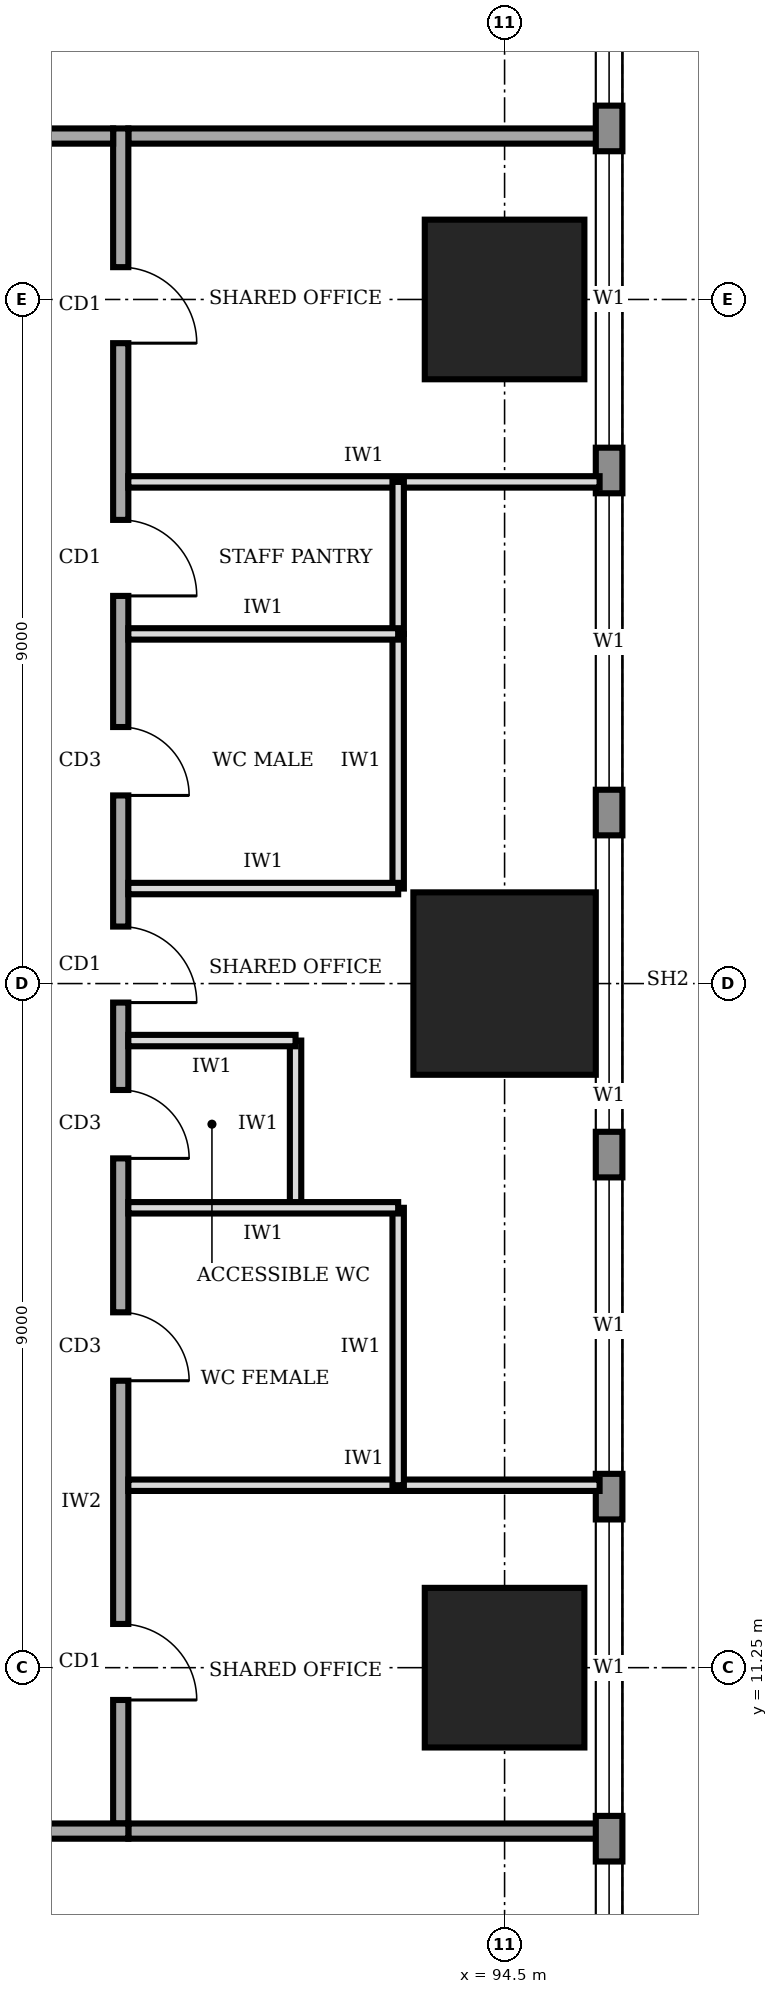
"""IFC4 building model, lengths in metres.
Left out: names, types, materials, properties, quantities, classifications, styles, units other than length and angle.
Written with IfcOpenShell. Run it as: python <this file> out.ifc"""

import sys

from ifc_helpers import new_model, si_unit, direction, frame, frame_2d, origin, origin_2d, place, context, subcontext, project, spatial, rectangle, extrude, element, fill, save


model = new_model("IFC4")
c1 = context("Model", 3, precision=1e-05, world=origin(), true_north=direction((0.0, 1.0)))
c2 = subcontext(c1, "Body", "Model", "MODEL_VIEW")
j1 = project(units=[si_unit("LENGTHUNIT", "METRE"), si_unit("PLANEANGLEUNIT", "RADIAN")], contexts=[c1])
p1 = place(None, origin())
s1 = spatial("IfcSite", under=j1, at=p1, CompositionType="ELEMENT")
p2 = place(p1, origin())
s2 = spatial("IfcBuilding", under=s1, at=p2, CompositionType="ELEMENT")
p3 = place(p2, frame((0.0, 0.0, 129.0)))
s3 = spatial("IfcBuildingStorey", under=s2, at=p3, CompositionType="ELEMENT", Elevation=129.0)
p4 = place(p3, frame((94.5, 11.25, 0.0), z_axis=(0.0, 0.0, 1.0), x_axis=(1.0, 0.0, 0.0)))
e1 = element("IfcColumn", 1, at=p4, inside=s3, PredefinedType="COLUMN", context=c2, shape_type="SweptSolid", body=[
    extrude(rectangle(XDim=2.1, YDim=2.1, at=origin_2d()), origin(), (0.0, 0.0, 1.0), 4.0),
])
p5 = place(p3, frame((94.5, 20.25, 0.0), z_axis=(0.0, 0.0, 1.0), x_axis=(1.0, 0.0, 0.0)))
e2 = element("IfcColumn", 2, at=p5, inside=s3, PredefinedType="COLUMN", context=c2, shape_type="SweptSolid", body=[
    extrude(rectangle(XDim=2.4, YDim=2.4, at=origin_2d()), origin(), (0.0, 0.0, 1.0), 4.0),
])
p6 = place(p3, frame((94.5, 29.25, 0.0), z_axis=(0.0, 0.0, 1.0), x_axis=(1.0, 0.0, 0.0)))
e3 = element("IfcColumn", 3, at=p6, inside=s3, PredefinedType="COLUMN", context=c2, shape_type="SweptSolid", body=[
    extrude(rectangle(XDim=2.1, YDim=2.1, at=origin_2d()), origin(), (0.0, 0.0, 1.0), 4.0),
])
p7 = place(p3, frame((95.875, 3.32, 0.0), z_axis=(0.0, 0.0, 1.0), x_axis=(0.0, 1.0, 0.0)))
e4 = element("IfcWall", 4, at=p7, inside=s3, PredefinedType="STANDARD", context=c2, shape_type="SweptSolid", body=[
    extrude(rectangle(XDim=33.96, YDim=0.35, at=frame_2d((16.98, 0.0))), origin(), (0.0, 0.0, 1.0), 3.75),
])
p8 = place(p7, frame((1.48, 0.0, 0.9)))
e5 = element("IfcOpeningElement", 5, at=p8, cuts=e4, PredefinedType="OPENING", context=c2, shape_type="SweptSolid", body=[
    extrude(rectangle(XDim=3.9, YDim=2.2, at=frame_2d((1.95, 1.1))), frame((0.0, 0.185, 0.0), z_axis=(0.0, -1.0, 0.0), x_axis=(1.0, 0.0, 0.0)), (0.0, 0.0, 1.0), 0.37),
])
p9 = place(p7, frame((5.98, 0.0, 0.9)))
e6 = element("IfcOpeningElement", 6, at=p9, cuts=e4, PredefinedType="OPENING", context=c2, shape_type="SweptSolid", body=[
    extrude(rectangle(XDim=3.9, YDim=2.2, at=frame_2d((1.95, 1.1))), frame((0.0, 0.185, 0.0), z_axis=(0.0, -1.0, 0.0), x_axis=(1.0, 0.0, 0.0)), (0.0, 0.0, 1.0), 0.37),
])
p10 = place(p7, frame((10.48, 0.0, 0.9)))
e7 = element("IfcOpeningElement", 7, at=p10, cuts=e4, PredefinedType="OPENING", context=c2, shape_type="SweptSolid", body=[
    extrude(rectangle(XDim=3.9, YDim=2.2, at=frame_2d((1.95, 1.1))), frame((0.0, 0.185, 0.0), z_axis=(0.0, -1.0, 0.0), x_axis=(1.0, 0.0, 0.0)), (0.0, 0.0, 1.0), 0.37),
])
p11 = place(p7, frame((14.98, 0.0, 0.9)))
e8 = element("IfcOpeningElement", 8, at=p11, cuts=e4, PredefinedType="OPENING", context=c2, shape_type="SweptSolid", body=[
    extrude(rectangle(XDim=3.9, YDim=2.2, at=frame_2d((1.95, 1.1))), frame((0.0, 0.185, 0.0), z_axis=(0.0, -1.0, 0.0), x_axis=(1.0, 0.0, 0.0)), (0.0, 0.0, 1.0), 0.37),
])
p12 = place(p7, frame((19.48, 0.0, 0.9)))
e9 = element("IfcOpeningElement", 9, at=p12, cuts=e4, PredefinedType="OPENING", context=c2, shape_type="SweptSolid", body=[
    extrude(rectangle(XDim=3.9, YDim=2.2, at=frame_2d((1.95, 1.1))), frame((0.0, 0.185, 0.0), z_axis=(0.0, -1.0, 0.0), x_axis=(1.0, 0.0, 0.0)), (0.0, 0.0, 1.0), 0.37),
])
p13 = place(p7, frame((23.98, 0.0, 0.9)))
e10 = element("IfcOpeningElement", 10, at=p13, cuts=e4, PredefinedType="OPENING", context=c2, shape_type="SweptSolid", body=[
    extrude(rectangle(XDim=3.9, YDim=2.2, at=frame_2d((1.95, 1.1))), frame((0.0, 0.185, 0.0), z_axis=(0.0, -1.0, 0.0), x_axis=(1.0, 0.0, 0.0)), (0.0, 0.0, 1.0), 0.37),
])
p14 = place(p7, frame((28.48, 0.0, 0.9)))
e11 = element("IfcOpeningElement", 11, at=p14, cuts=e4, PredefinedType="OPENING", context=c2, shape_type="SweptSolid", body=[
    extrude(rectangle(XDim=3.9, YDim=2.2, at=frame_2d((1.95, 1.1))), frame((0.0, 0.185, 0.0), z_axis=(0.0, -1.0, 0.0), x_axis=(1.0, 0.0, 0.0)), (0.0, 0.0, 1.0), 0.37),
])
p15 = place(p3, frame((72.65, 9.1, 0.0), z_axis=(0.0, 0.0, 1.0), x_axis=(1.0, 0.0, 0.0)))
e12 = element("IfcWall", 12, at=p15, inside=s3, PredefinedType="SOLIDWALL", context=c2, shape_type="SweptSolid", body=[
    extrude(rectangle(XDim=16.9, YDim=0.2, at=frame_2d((8.45, 0.0))), origin(), (0.0, 0.0, 1.0), 3.75),
])
p16 = place(p15, frame((1.325, 0.0, 0.0)))
e13 = element("IfcOpeningElement", 13, at=p16, cuts=e12, PredefinedType="OPENING", context=c2, shape_type="SweptSolid", body=[
    extrude(rectangle(XDim=1.0, YDim=2.1, at=frame_2d((0.5, 1.05))), frame((0.0, 0.11, 0.0), z_axis=(0.0, -1.0, 0.0), x_axis=(1.0, 0.0, 0.0)), (0.0, 0.0, 1.0), 0.22),
])
p17 = place(p15, frame((5.6, 0.0, 0.0)))
e14 = element("IfcOpeningElement", 14, at=p17, cuts=e12, PredefinedType="OPENING", context=c2, shape_type="SweptSolid", body=[
    extrude(rectangle(XDim=1.0, YDim=2.1, at=frame_2d((0.5, 1.05))), frame((0.0, 0.11, 0.0), z_axis=(0.0, -1.0, 0.0), x_axis=(1.0, 0.0, 0.0)), (0.0, 0.0, 1.0), 0.22),
])
p18 = place(p15, frame((12.125, 0.0, 0.0)))
e15 = element("IfcOpeningElement", 15, at=p18, cuts=e12, PredefinedType="OPENING", context=c2, shape_type="SweptSolid", body=[
    extrude(rectangle(XDim=1.0, YDim=2.1, at=frame_2d((0.5, 1.05))), frame((0.0, 0.11, 0.0), z_axis=(0.0, -1.0, 0.0), x_axis=(1.0, 0.0, 0.0)), (0.0, 0.0, 1.0), 0.22),
])
p19 = place(p3, frame((89.45, 9.2, 0.0), z_axis=(0.0, 0.0, 1.0), x_axis=(0.0, 1.0, 0.0)))
e16 = element("IfcWall", 16, at=p19, inside=s3, PredefinedType="SOLIDWALL", context=c2, shape_type="SweptSolid", body=[
    extrude(rectangle(XDim=22.3, YDim=0.2, at=frame_2d((11.15, 0.0))), origin(), (0.0, 0.0, 1.0), 3.75),
])
p20 = place(p19, frame((1.625, 0.0, 0.0)))
e17 = element("IfcOpeningElement", 17, at=p20, cuts=e16, PredefinedType="OPENING", context=c2, shape_type="SweptSolid", body=[
    extrude(rectangle(XDim=1.0, YDim=2.1, at=frame_2d((0.5, 1.05))), frame((0.0, 0.11, 0.0), z_axis=(0.0, -1.0, 0.0), x_axis=(1.0, 0.0, 0.0)), (0.0, 0.0, 1.0), 0.22),
])
p21 = place(p19, frame((5.825, 0.0, 0.0)))
e18 = element("IfcOpeningElement", 18, at=p21, cuts=e16, PredefinedType="OPENING", context=c2, shape_type="SweptSolid", body=[
    extrude(rectangle(XDim=0.9, YDim=2.1, at=frame_2d((0.45, 1.05))), frame((0.0, 0.11, 0.0), z_axis=(0.0, -1.0, 0.0), x_axis=(1.0, 0.0, 0.0)), (0.0, 0.0, 1.0), 0.22),
])
p22 = place(p19, frame((8.75, 0.0, 0.0)))
e19 = element("IfcOpeningElement", 19, at=p22, cuts=e16, PredefinedType="OPENING", context=c2, shape_type="SweptSolid", body=[
    extrude(rectangle(XDim=0.9, YDim=2.1, at=frame_2d((0.45, 1.05))), frame((0.0, 0.11, 0.0), z_axis=(0.0, -1.0, 0.0), x_axis=(1.0, 0.0, 0.0)), (0.0, 0.0, 1.0), 0.22),
])
p23 = place(p19, frame((13.525, 0.0, 0.0)))
e20 = element("IfcOpeningElement", 20, at=p23, cuts=e16, PredefinedType="OPENING", context=c2, shape_type="SweptSolid", body=[
    extrude(rectangle(XDim=0.9, YDim=2.1, at=frame_2d((0.45, 1.05))), frame((0.0, 0.11, 0.0), z_axis=(0.0, -1.0, 0.0), x_axis=(1.0, 0.0, 0.0)), (0.0, 0.0, 1.0), 0.22),
])
p24 = place(p19, frame((16.15, 0.0, 0.0)))
e21 = element("IfcOpeningElement", 21, at=p24, cuts=e16, PredefinedType="OPENING", context=c2, shape_type="SweptSolid", body=[
    extrude(rectangle(XDim=1.0, YDim=2.1, at=frame_2d((0.5, 1.05))), frame((0.0, 0.11, 0.0), z_axis=(0.0, -1.0, 0.0), x_axis=(1.0, 0.0, 0.0)), (0.0, 0.0, 1.0), 0.22),
])
p25 = place(p19, frame((10.8, 0.0, 0.0)))
e22 = element("IfcOpeningElement", 22, at=p25, cuts=e16, PredefinedType="OPENING", context=c2, shape_type="SweptSolid", body=[
    extrude(rectangle(XDim=1.0, YDim=2.1, at=frame_2d((0.5, 1.05))), frame((0.0, 0.11, 0.0), z_axis=(0.0, -1.0, 0.0), x_axis=(1.0, 0.0, 0.0)), (0.0, 0.0, 1.0), 0.22),
])
p26 = place(p19, frame((19.475, 0.0, 0.0)))
e23 = element("IfcOpeningElement", 23, at=p26, cuts=e16, PredefinedType="OPENING", context=c2, shape_type="SweptSolid", body=[
    extrude(rectangle(XDim=1.0, YDim=2.1, at=frame_2d((0.5, 1.05))), frame((0.0, 0.11, 0.0), z_axis=(0.0, -1.0, 0.0), x_axis=(1.0, 0.0, 0.0)), (0.0, 0.0, 1.0), 0.22),
])
p27 = place(p3, frame((89.35, 31.4, 0.0), z_axis=(0.0, 0.0, 1.0), x_axis=(-1.0, 0.0, 0.0)))
e24 = element("IfcWall", 24, at=p27, inside=s3, PredefinedType="SOLIDWALL", context=c2, shape_type="SweptSolid", body=[
    extrude(rectangle(XDim=16.9, YDim=0.2, at=frame_2d((8.45, 0.0))), origin(), (0.0, 0.0, 1.0), 3.75),
])
p28 = place(p27, frame((13.975, 0.0, 0.0)))
e25 = element("IfcOpeningElement", 25, at=p28, cuts=e24, PredefinedType="OPENING", context=c2, shape_type="SweptSolid", body=[
    extrude(rectangle(XDim=1.8, YDim=2.1, at=frame_2d((0.9, 1.05))), frame((0.0, 0.11, 0.0), z_axis=(0.0, -1.0, 0.0), x_axis=(1.0, 0.0, 0.0)), (0.0, 0.0, 1.0), 0.22),
])
p29 = place(p27, frame((7.85, 0.0, 0.0)))
e26 = element("IfcOpeningElement", 26, at=p29, cuts=e24, PredefinedType="OPENING", context=c2, shape_type="SweptSolid", body=[
    extrude(rectangle(XDim=1.0, YDim=2.1, at=frame_2d((0.5, 1.05))), frame((0.0, 0.11, 0.0), z_axis=(0.0, -1.0, 0.0), x_axis=(1.0, 0.0, 0.0)), (0.0, 0.0, 1.0), 0.22),
])
p30 = place(p27, frame((1.325, 0.0, 0.0)))
e27 = element("IfcOpeningElement", 27, at=p30, cuts=e24, PredefinedType="OPENING", context=c2, shape_type="SweptSolid", body=[
    extrude(rectangle(XDim=1.0, YDim=2.1, at=frame_2d((0.5, 1.05))), frame((0.0, 0.11, 0.0), z_axis=(0.0, -1.0, 0.0), x_axis=(1.0, 0.0, 0.0)), (0.0, 0.0, 1.0), 0.22),
])
for number, where, z_axis, x_axis in (
    (28, (89.55, 9.1, 0.0), (0.0, 0.0, 1.0), (1.0, 0.0, 0.0)),
    (29, (89.55, 31.4, 0.0), (0.0, 0.0, 1.0), (1.0, 0.0, 0.0)),
):
    element("IfcWall", number, at=place(p3, frame(where, z_axis=z_axis, x_axis=x_axis)), inside=s3, PredefinedType="SOLIDWALL", context=c2, shape_type="SweptSolid", body=[
        extrude(rectangle(XDim=6.2, YDim=0.2, at=frame_2d((3.1, 0.0))), origin(), (0.0, 0.0, 1.0), 3.75),
    ])
for number, where, z_axis, x_axis in (
    (30, (89.55, 13.65, 0.0), (0.0, 0.0, 1.0), (1.0, 0.0, 0.0)),
    (31, (89.55, 26.85, 0.0), (0.0, 0.0, 1.0), (1.0, 0.0, 0.0)),
):
    element("IfcWall", number, at=place(p3, frame(where, z_axis=z_axis, x_axis=x_axis)), inside=s3, PredefinedType="PARTITIONING", context=c2, shape_type="SweptSolid", body=[
        extrude(rectangle(XDim=6.2, YDim=0.15, at=frame_2d((3.1, 0.0))), origin(), (0.0, 0.0, 1.0), 3.75),
    ])
p31 = place(p3, frame((89.55, 17.3, 0.0), z_axis=(0.0, 0.0, 1.0), x_axis=(1.0, 0.0, 0.0)))
e32 = element("IfcWall", 32, at=p31, inside=s3, PredefinedType="PARTITIONING", context=c2, shape_type="SweptSolid", body=[
    extrude(rectangle(XDim=3.55, YDim=0.15, at=frame_2d((1.775, 0.0))), origin(), (0.0, 0.0, 1.0), 3.75),
])
p32 = place(p3, frame((89.55, 19.5, 0.0), z_axis=(0.0, 0.0, 1.0), x_axis=(1.0, 0.0, 0.0)))
e33 = element("IfcWall", 33, at=p32, inside=s3, PredefinedType="PARTITIONING", context=c2, shape_type="SweptSolid", body=[
    extrude(rectangle(XDim=2.2, YDim=0.15, at=frame_2d((1.1, 0.0))), origin(), (0.0, 0.0, 1.0), 2.85),
])
for number, where, z_axis, x_axis in (
    (34, (89.55, 21.5, 0.0), (0.0, 0.0, 1.0), (1.0, 0.0, 0.0)),
    (35, (89.55, 24.85, 0.0), (0.0, 0.0, 1.0), (1.0, 0.0, 0.0)),
):
    element("IfcWall", number, at=place(p3, frame(where, z_axis=z_axis, x_axis=x_axis)), inside=s3, PredefinedType="PARTITIONING", context=c2, shape_type="SweptSolid", body=[
        extrude(rectangle(XDim=3.55, YDim=0.15, at=frame_2d((1.775, 0.0))), origin(), (0.0, 0.0, 1.0), 3.75),
    ])
p33 = place(p3, frame((93.1, 13.65, 0.0), z_axis=(0.0, 0.0, 1.0), x_axis=(0.0, 1.0, 0.0)))
e36 = element("IfcWall", 36, at=p33, inside=s3, PredefinedType="PARTITIONING", context=c2, shape_type="SweptSolid", body=[
    extrude(rectangle(XDim=3.65, YDim=0.15, at=frame_2d((1.825, 0.0))), origin(), (0.0, 0.0, 1.0), 3.75),
])
p34 = place(p3, frame((91.75, 17.3, 0.0), z_axis=(0.0, 0.0, 1.0), x_axis=(0.0, 1.0, 0.0)))
e37 = element("IfcWall", 37, at=p34, inside=s3, PredefinedType="PARTITIONING", context=c2, shape_type="SweptSolid", body=[
    extrude(rectangle(XDim=2.2, YDim=0.15, at=frame_2d((1.1, 0.0))), origin(), (0.0, 0.0, 1.0), 3.75),
])
p35 = place(p3, frame((93.1, 21.5, 0.0), z_axis=(0.0, 0.0, 1.0), x_axis=(0.0, 1.0, 0.0)))
e38 = element("IfcWall", 38, at=p35, inside=s3, PredefinedType="PARTITIONING", context=c2, shape_type="SweptSolid", body=[
    extrude(rectangle(XDim=3.35, YDim=0.15, at=frame_2d((1.675, 0.0))), origin(), (0.0, 0.0, 1.0), 3.75),
])
p36 = place(p3, frame((93.1, 24.85, 0.0), z_axis=(0.0, 0.0, 1.0), x_axis=(0.0, 1.0, 0.0)))
e39 = element("IfcWall", 39, at=p36, inside=s3, PredefinedType="PARTITIONING", context=c2, shape_type="SweptSolid", body=[
    extrude(rectangle(XDim=2.0, YDim=0.15, at=frame_2d((1.0, 0.0))), origin(), (0.0, 0.0, 1.0), 3.75),
])
p37 = place(p8, origin())
e40 = element("IfcWindow", 40, at=p37, inside=s3, PartitioningType="SINGLE_PANEL", PredefinedType="WINDOW", context=c2, shape_type="SweptSolid", body=[
    extrude(rectangle(XDim=3.9, YDim=2.2, at=frame_2d((1.95, 1.1))), frame((0.0, 0.03, 0.0), z_axis=(0.0, -1.0, 0.0), x_axis=(1.0, 0.0, 0.0)), (0.0, 0.0, 1.0), 0.06),
])
fill(e5, e40)
p38 = place(p9, origin())
e41 = element("IfcWindow", 41, at=p38, inside=s3, PartitioningType="SINGLE_PANEL", PredefinedType="WINDOW", context=c2, shape_type="SweptSolid", body=[
    extrude(rectangle(XDim=3.9, YDim=2.2, at=frame_2d((1.95, 1.1))), frame((0.0, 0.03, 0.0), z_axis=(0.0, -1.0, 0.0), x_axis=(1.0, 0.0, 0.0)), (0.0, 0.0, 1.0), 0.06),
])
fill(e6, e41)
p39 = place(p10, origin())
e42 = element("IfcWindow", 42, at=p39, inside=s3, PartitioningType="SINGLE_PANEL", PredefinedType="WINDOW", context=c2, shape_type="SweptSolid", body=[
    extrude(rectangle(XDim=3.9, YDim=2.2, at=frame_2d((1.95, 1.1))), frame((0.0, 0.03, 0.0), z_axis=(0.0, -1.0, 0.0), x_axis=(1.0, 0.0, 0.0)), (0.0, 0.0, 1.0), 0.06),
])
fill(e7, e42)
p40 = place(p11, origin())
e43 = element("IfcWindow", 43, at=p40, inside=s3, PartitioningType="SINGLE_PANEL", PredefinedType="WINDOW", context=c2, shape_type="SweptSolid", body=[
    extrude(rectangle(XDim=3.9, YDim=2.2, at=frame_2d((1.95, 1.1))), frame((0.0, 0.03, 0.0), z_axis=(0.0, -1.0, 0.0), x_axis=(1.0, 0.0, 0.0)), (0.0, 0.0, 1.0), 0.06),
])
fill(e8, e43)
p41 = place(p12, origin())
e44 = element("IfcWindow", 44, at=p41, inside=s3, PartitioningType="SINGLE_PANEL", PredefinedType="WINDOW", context=c2, shape_type="SweptSolid", body=[
    extrude(rectangle(XDim=3.9, YDim=2.2, at=frame_2d((1.95, 1.1))), frame((0.0, 0.03, 0.0), z_axis=(0.0, -1.0, 0.0), x_axis=(1.0, 0.0, 0.0)), (0.0, 0.0, 1.0), 0.06),
])
fill(e9, e44)
p42 = place(p13, origin())
e45 = element("IfcWindow", 45, at=p42, inside=s3, PartitioningType="SINGLE_PANEL", PredefinedType="WINDOW", context=c2, shape_type="SweptSolid", body=[
    extrude(rectangle(XDim=3.9, YDim=2.2, at=frame_2d((1.95, 1.1))), frame((0.0, 0.03, 0.0), z_axis=(0.0, -1.0, 0.0), x_axis=(1.0, 0.0, 0.0)), (0.0, 0.0, 1.0), 0.06),
])
fill(e10, e45)
p43 = place(p14, origin())
e46 = element("IfcWindow", 46, at=p43, inside=s3, PartitioningType="SINGLE_PANEL", PredefinedType="WINDOW", context=c2, shape_type="SweptSolid", body=[
    extrude(rectangle(XDim=3.9, YDim=2.2, at=frame_2d((1.95, 1.1))), frame((0.0, 0.03, 0.0), z_axis=(0.0, -1.0, 0.0), x_axis=(1.0, 0.0, 0.0)), (0.0, 0.0, 1.0), 0.06),
])
fill(e11, e46)
p44 = place(p20, frame((1.0, 0.0, 0.0), z_axis=(0.0, 0.0, 1.0), x_axis=(-1.0, 0.0, 0.0)))
e47 = element("IfcDoor", 47, at=p44, inside=s3, OperationType="SINGLE_SWING_RIGHT", PredefinedType="DOOR", context=c2, shape_type="SweptSolid", body=[
    extrude(rectangle(XDim=1.0, YDim=2.1, at=frame_2d((0.5, 1.05))), frame((0.0, 0.025, 0.0), z_axis=(0.0, -1.0, 0.0), x_axis=(1.0, 0.0, 0.0)), (0.0, 0.0, 1.0), 0.05),
])
fill(e17, e47)
p45 = place(p21, frame((0.9, 0.0, 0.0), z_axis=(0.0, 0.0, 1.0), x_axis=(-1.0, 0.0, 0.0)))
e48 = element("IfcDoor", 48, at=p45, inside=s3, OperationType="SINGLE_SWING_RIGHT", PredefinedType="DOOR", context=c2, shape_type="SweptSolid", body=[
    extrude(rectangle(XDim=0.9, YDim=2.1, at=frame_2d((0.45, 1.05))), frame((0.0, 0.025, 0.0), z_axis=(0.0, -1.0, 0.0), x_axis=(1.0, 0.0, 0.0)), (0.0, 0.0, 1.0), 0.05),
])
fill(e18, e48)
p46 = place(p22, frame((0.9, 0.0, 0.0), z_axis=(0.0, 0.0, 1.0), x_axis=(-1.0, 0.0, 0.0)))
e49 = element("IfcDoor", 49, at=p46, inside=s3, OperationType="SINGLE_SWING_RIGHT", PredefinedType="DOOR", context=c2, shape_type="SweptSolid", body=[
    extrude(rectangle(XDim=0.9, YDim=2.1, at=frame_2d((0.45, 1.05))), frame((0.0, 0.025, 0.0), z_axis=(0.0, -1.0, 0.0), x_axis=(1.0, 0.0, 0.0)), (0.0, 0.0, 1.0), 0.05),
])
fill(e19, e49)
p47 = place(p23, frame((0.9, 0.0, 0.0), z_axis=(0.0, 0.0, 1.0), x_axis=(-1.0, 0.0, 0.0)))
e50 = element("IfcDoor", 50, at=p47, inside=s3, OperationType="SINGLE_SWING_RIGHT", PredefinedType="DOOR", context=c2, shape_type="SweptSolid", body=[
    extrude(rectangle(XDim=0.9, YDim=2.1, at=frame_2d((0.45, 1.05))), frame((0.0, 0.025, 0.0), z_axis=(0.0, -1.0, 0.0), x_axis=(1.0, 0.0, 0.0)), (0.0, 0.0, 1.0), 0.05),
])
fill(e20, e50)
p48 = place(p24, frame((1.0, 0.0, 0.0), z_axis=(0.0, 0.0, 1.0), x_axis=(-1.0, 0.0, 0.0)))
e51 = element("IfcDoor", 51, at=p48, inside=s3, OperationType="SINGLE_SWING_RIGHT", PredefinedType="DOOR", context=c2, shape_type="SweptSolid", body=[
    extrude(rectangle(XDim=1.0, YDim=2.1, at=frame_2d((0.5, 1.05))), frame((0.0, 0.025, 0.0), z_axis=(0.0, -1.0, 0.0), x_axis=(1.0, 0.0, 0.0)), (0.0, 0.0, 1.0), 0.05),
])
fill(e21, e51)
p49 = place(p25, frame((1.0, 0.0, 0.0), z_axis=(0.0, 0.0, 1.0), x_axis=(-1.0, 0.0, 0.0)))
e52 = element("IfcDoor", 52, at=p49, inside=s3, OperationType="SINGLE_SWING_RIGHT", PredefinedType="DOOR", context=c2, shape_type="SweptSolid", body=[
    extrude(rectangle(XDim=1.0, YDim=2.1, at=frame_2d((0.5, 1.05))), frame((0.0, 0.025, 0.0), z_axis=(0.0, -1.0, 0.0), x_axis=(1.0, 0.0, 0.0)), (0.0, 0.0, 1.0), 0.05),
])
fill(e22, e52)
p50 = place(p26, frame((1.0, 0.0, 0.0), z_axis=(0.0, 0.0, 1.0), x_axis=(-1.0, 0.0, 0.0)))
e53 = element("IfcDoor", 53, at=p50, inside=s3, OperationType="SINGLE_SWING_RIGHT", PredefinedType="DOOR", context=c2, shape_type="SweptSolid", body=[
    extrude(rectangle(XDim=1.0, YDim=2.1, at=frame_2d((0.5, 1.05))), frame((0.0, 0.025, 0.0), z_axis=(0.0, -1.0, 0.0), x_axis=(1.0, 0.0, 0.0)), (0.0, 0.0, 1.0), 0.05),
])
fill(e23, e53)
save(model, sys.argv[1])
